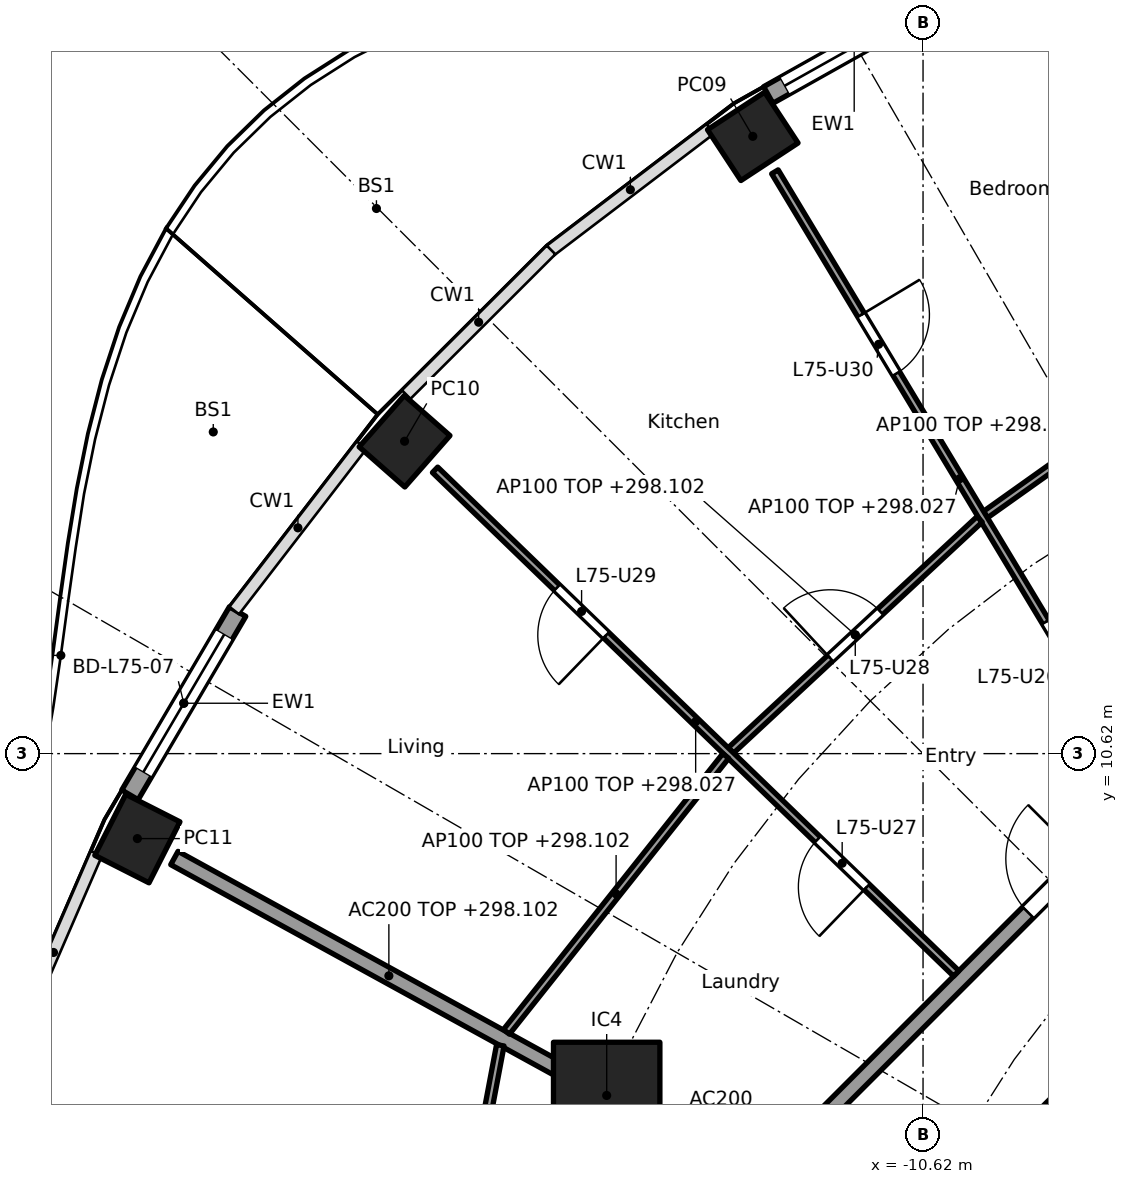
"""IFC4 building model, lengths in metres.
Left out: names, types, materials, properties, quantities, classifications, styles, units other than length and angle.
Written with IfcOpenShell. Run it as: python <this file> out.ifc"""

import sys

from ifc_helpers import new_model, si_unit, direction, frame, frame_2d, origin, origin_2d, place, context, subcontext, project, spatial, rectangle, hollow_rectangle, extrude, element, fill, save


model = new_model("IFC4")
c1 = context("Model", 3, precision=1e-05, world=origin(), true_north=direction((0.0, 1.0)))
c2 = subcontext(c1, "Body", "Model", "MODEL_VIEW")
j1 = project(units=[si_unit("LENGTHUNIT", "METRE"), si_unit("PLANEANGLEUNIT", "RADIAN")], contexts=[c1])
p1 = place(None, origin())
s1 = spatial("IfcSite", under=j1, at=p1, CompositionType="ELEMENT")
p2 = place(p1, origin())
s2 = spatial("IfcBuilding", under=s1, at=p2, CompositionType="ELEMENT")
p3 = place(p2, frame((0.0, 0.0, 295.5)))
s3 = spatial("IfcBuildingStorey", under=s2, at=p3, CompositionType="ELEMENT", Elevation=295.5)
for number, where, z_axis, x_axis in (
    (1, (-12.86, 18.741, 0.0), (0.0, 0.0, 1.0), (-0.836, -0.549, 0.0)),
    (2, (-17.441, 14.73, 0.0), (0.0, 0.0, 1.0), (-0.66, -0.751, 0.0)),
    (3, (-20.957, 9.502, 0.0), (0.0, 0.0, 1.0), (-0.452, -0.892, 0.0)),
):
    element("IfcColumn", number, at=place(p3, frame(where, z_axis=z_axis, x_axis=x_axis)), inside=s3, PredefinedType="COLUMN", context=c2, shape_type="SweptSolid", body=[
        extrude(hollow_rectangle(XDim=0.9, YDim=0.8, WallThickness=0.028, at=origin_2d()), origin(), (0.0, 0.0, 1.0), 3.7),
    ])
p4 = place(p3, frame((-14.782, 6.123, 0.0), z_axis=(0.0, 0.0, 1.0), x_axis=(1.0, 0.0, 0.0)))
e4 = element("IfcColumn", 4, at=p4, inside=s3, PredefinedType="COLUMN", context=c2, shape_type="SweptSolid", body=[
    extrude(rectangle(XDim=1.4, YDim=1.4, at=origin_2d()), origin(), (0.0, 0.0, 1.0), 3.7),
])
p5 = place(p3, frame((-12.656, 19.285, 0.0), z_axis=(0.0, 0.0, 1.0), x_axis=(0.872075426507, 0.489371485154, 0.0)))
e5 = element("IfcWall", 5, at=p5, inside=s3, PredefinedType="SOLIDWALL", context=c2, shape_type="SweptSolid", body=[
    extrude(rectangle(XDim=2.593, YDim=0.25, at=frame_2d((1.297, 0.0))), origin(), (0.0, 0.0, 1.0), 3.28),
])
p6 = place(p5, frame((0.247, 0.0, 0.0)))
e6 = element("IfcOpeningElement", 6, at=p6, cuts=e5, PredefinedType="OPENING", context=c2, shape_type="SweptSolid", body=[
    extrude(rectangle(XDim=2.1, YDim=2.4, at=frame_2d((1.05, 1.2))), frame((0.0, 0.135, 0.0), z_axis=(0.0, -1.0, 0.0), x_axis=(1.0, 0.0, 0.0)), (0.0, 0.0, 1.0), 0.27),
])
p7 = place(p3, frame((-21.054, 10.077, 0.0), z_axis=(0.0, 0.0, 1.0), x_axis=(0.506371364425, 0.862315511452, 0.0)))
e7 = element("IfcWall", 7, at=p7, inside=s3, PredefinedType="SOLIDWALL", context=c2, shape_type="SweptSolid", body=[
    extrude(rectangle(XDim=2.796, YDim=0.25, at=frame_2d((1.398, 0.0))), origin(), (0.0, 0.0, 1.0), 3.28),
])
p8 = place(p7, frame((0.348, 0.0, 0.0)))
e8 = element("IfcOpeningElement", 8, at=p8, cuts=e7, PredefinedType="OPENING", context=c2, shape_type="SweptSolid", body=[
    extrude(rectangle(XDim=2.1, YDim=2.4, at=frame_2d((1.05, 1.2))), frame((0.0, 0.135, 0.0), z_axis=(0.0, -1.0, 0.0), x_axis=(1.0, 0.0, 0.0)), (0.0, 0.0, 1.0), 0.27),
])
p9 = place(p3, frame((-4.613, 9.988, 0.0), z_axis=(0.0, 0.0, 1.0), x_axis=(-0.707106781187, -0.707106781187, 0.0)))
e9 = element("IfcWall", 9, at=p9, inside=s3, PredefinedType="SHEAR", context=c2, shape_type="SweptSolid", body=[
    extrude(rectangle(XDim=7.602, YDim=0.6, at=frame_2d((3.801, 0.0))), origin(), (0.0, 0.0, 1.0), 3.28),
])
p10 = place(p9, frame((0.351, 0.0, 0.0)))
e10 = element("IfcOpeningElement", 10, at=p10, cuts=e9, PredefinedType="OPENING", context=c2, shape_type="SweptSolid", body=[
    extrude(rectangle(XDim=1.1, YDim=2.1, at=frame_2d((0.55, 1.05))), frame((0.0, 0.31, 0.0), z_axis=(0.0, -1.0, 0.0), x_axis=(1.0, 0.0, 0.0)), (0.0, 0.0, 1.0), 0.62),
])
p11 = place(p3, frame((-12.657, 5.243, 0.0), z_axis=(0.0, 0.0, 1.0), x_axis=(-0.923869415315, 0.382707856524, 0.0)))
e11 = element("IfcWall", 11, at=p11, inside=s3, PredefinedType="PARTITIONING", context=c2, shape_type="SweptSolid", body=[
    extrude(rectangle(XDim=2.2, YDim=0.2, at=frame_2d((1.1, 0.0))), origin(), (0.0, 0.0, 1.0), 3.28),
])
p12 = place(p3, frame((-14.826, 6.147, 0.0), z_axis=(0.0, 0.0, 1.0), x_axis=(-0.876484755865, 0.481429613481, 0.0)))
e12 = element("IfcWall", 12, at=p12, inside=s3, PredefinedType="PARTITIONING", context=c2, shape_type="SweptSolid", body=[
    extrude(rectangle(XDim=6.439, YDim=0.2, at=frame_2d((3.219, 0.0))), origin(), (0.0, 0.0, 1.0), 2.602),
])
p13 = place(p3, frame((-5.275, 12.494, 0.0), z_axis=(0.0, 0.0, 1.0), x_axis=(-0.707106781187, -0.707106781187, 0.0)))
e13 = element("IfcWall", 13, at=p13, inside=s3, PredefinedType="PARTITIONING", context=c2, shape_type="SweptSolid", body=[
    extrude(rectangle(XDim=10.209, YDim=0.2, at=frame_2d((5.104, 0.0))), origin(), (0.0, 0.0, 1.0), 3.28),
])
p14 = place(p13, frame((4.604, 0.0, 0.0)))
e14 = element("IfcOpeningElement", 14, at=p14, cuts=e13, PredefinedType="OPENING", context=c2, shape_type="SweptSolid", body=[
    extrude(rectangle(XDim=1.0, YDim=2.1, at=frame_2d((0.5, 1.05))), frame((0.0, 0.11, 0.0), z_axis=(0.0, -1.0, 0.0), x_axis=(1.0, 0.0, 0.0)), (0.0, 0.0, 1.0), 0.22),
])
p15 = place(p3, frame((-6.508, 16.103, 0.0), z_axis=(0.0, 0.0, 1.0), x_axis=(-0.815202203556, -0.579176456114, 0.0)))
e15 = element("IfcWall", 15, at=p15, inside=s3, PredefinedType="PARTITIONING", context=c2, shape_type="SweptSolid", body=[
    extrude(rectangle(XDim=4.036, YDim=0.1, at=frame_2d((2.018, 0.0))), origin(), (0.0, 0.0, 1.0), 2.602),
])
p16 = place(p3, frame((-7.709, 10.197, 0.0), z_axis=(0.0, 0.0, 1.0), x_axis=(-0.515516160663, 0.856879856278, 0.0)))
e16 = element("IfcWall", 16, at=p16, inside=s3, PredefinedType="PARTITIONING", context=c2, shape_type="SweptSolid", body=[
    extrude(rectangle(XDim=9.426, YDim=0.1, at=frame_2d((4.713, 0.0))), origin(), (0.0, 0.0, 1.0), 2.527),
])
p17 = place(p16, frame((1.615, 0.0, 0.0)))
e17 = element("IfcOpeningElement", 17, at=p17, cuts=e16, PredefinedType="OPENING", context=c2, shape_type="SweptSolid", body=[
    extrude(rectangle(XDim=0.9, YDim=2.1, at=frame_2d((0.45, 1.05))), frame((0.0, 0.06, 0.0), z_axis=(0.0, -1.0, 0.0), x_axis=(1.0, 0.0, 0.0)), (0.0, 0.0, 1.0), 0.12),
])
p18 = place(p16, frame((6.328, 0.0, 0.0)))
e18 = element("IfcOpeningElement", 18, at=p18, cuts=e16, PredefinedType="OPENING", context=c2, shape_type="SweptSolid", body=[
    extrude(rectangle(XDim=0.9, YDim=2.1, at=frame_2d((0.45, 1.05))), frame((0.0, 0.06, 0.0), z_axis=(0.0, -1.0, 0.0), x_axis=(1.0, 0.0, 0.0)), (0.0, 0.0, 1.0), 0.12),
])
p19 = place(p3, frame((-9.875, 13.702, 0.0), z_axis=(0.0, 0.0, 1.0), x_axis=(-0.732618266441, -0.680639754699, 0.0)))
e19 = element("IfcWall", 19, at=p19, inside=s3, PredefinedType="PARTITIONING", context=c2, shape_type="SweptSolid", body=[
    extrude(rectangle(XDim=4.467, YDim=0.1, at=frame_2d((2.233, 0.0))), origin(), (0.0, 0.0, 1.0), 2.602),
])
p20 = place(p19, frame((1.783, 0.0, 0.0)))
e20 = element("IfcOpeningElement", 20, at=p20, cuts=e19, PredefinedType="OPENING", context=c2, shape_type="SweptSolid", body=[
    extrude(rectangle(XDim=0.9, YDim=2.1, at=frame_2d((0.45, 1.05))), frame((0.0, 0.06, 0.0), z_axis=(0.0, -1.0, 0.0), x_axis=(1.0, 0.0, 0.0)), (0.0, 0.0, 1.0), 0.12),
])
p21 = place(p3, frame((-10.183, 7.727, 0.0), z_axis=(0.0, 0.0, 1.0), x_axis=(-0.719063433856, 0.694944442449, 0.0)))
e21 = element("IfcWall", 21, at=p21, inside=s3, PredefinedType="PARTITIONING", context=c2, shape_type="SweptSolid", body=[
    extrude(rectangle(XDim=9.535, YDim=0.1, at=frame_2d((4.768, 0.0))), origin(), (0.0, 0.0, 1.0), 2.527),
])
p22 = place(p21, frame((1.637, 0.0, 0.0)))
e22 = element("IfcOpeningElement", 22, at=p22, cuts=e21, PredefinedType="OPENING", context=c2, shape_type="SweptSolid", body=[
    extrude(rectangle(XDim=0.9, YDim=2.1, at=frame_2d((0.45, 1.05))), frame((0.0, 0.06, 0.0), z_axis=(0.0, -1.0, 0.0), x_axis=(1.0, 0.0, 0.0)), (0.0, 0.0, 1.0), 0.12),
])
p23 = place(p21, frame((6.405, 0.0, 0.0)))
e23 = element("IfcOpeningElement", 23, at=p23, cuts=e21, PredefinedType="OPENING", context=c2, shape_type="SweptSolid", body=[
    extrude(rectangle(XDim=0.9, YDim=2.1, at=frame_2d((0.45, 1.05))), frame((0.0, 0.06, 0.0), z_axis=(0.0, -1.0, 0.0), x_axis=(1.0, 0.0, 0.0)), (0.0, 0.0, 1.0), 0.12),
])
p24 = place(p3, frame((-13.216, 10.589, 0.0), z_axis=(0.0, 0.0, 1.0), x_axis=(-0.622251572882, -0.782817335045, 0.0)))
e24 = element("IfcWall", 24, at=p24, inside=s3, PredefinedType="PARTITIONING", context=c2, shape_type="SweptSolid", body=[
    extrude(rectangle(XDim=4.636, YDim=0.1, at=frame_2d((2.318, 0.0))), origin(), (0.0, 0.0, 1.0), 2.602),
])
p25 = place(p3, frame((-16.181, 6.783, 0.0), z_axis=(0.0, 0.0, 1.0), x_axis=(-0.185670583745, -0.982612046706, 0.0)))
e25 = element("IfcWall", 25, at=p25, inside=s3, PredefinedType="PARTITIONING", context=c2, shape_type="SweptSolid", body=[
    extrude(rectangle(XDim=4.351, YDim=0.1, at=frame_2d((2.176, 0.0))), origin(), (0.0, 0.0, 1.0), 2.602),
])
p26 = place(p25, frame((1.726, 0.0, 0.0)))
e26 = element("IfcOpeningElement", 26, at=p26, cuts=e25, PredefinedType="OPENING", context=c2, shape_type="SweptSolid", body=[
    extrude(rectangle(XDim=0.9, YDim=2.1, at=frame_2d((0.45, 1.05))), frame((0.0, 0.06, 0.0), z_axis=(0.0, -1.0, 0.0), x_axis=(1.0, 0.0, 0.0)), (0.0, 0.0, 1.0), 0.12),
])
p27 = place(p6, origin())
e27 = element("IfcDoor", 27, at=p27, inside=s3, OperationType="SLIDING_TO_LEFT", PredefinedType="DOOR", context=c2, shape_type="SweptSolid", body=[
    extrude(rectangle(XDim=2.1, YDim=2.4, at=frame_2d((1.05, 1.2))), frame((0.0, 0.025, 0.0), z_axis=(0.0, -1.0, 0.0), x_axis=(1.0, 0.0, 0.0)), (0.0, 0.0, 1.0), 0.05),
])
fill(e6, e27)
p28 = place(p8, origin())
e28 = element("IfcDoor", 28, at=p28, inside=s3, OperationType="SLIDING_TO_LEFT", PredefinedType="DOOR", context=c2, shape_type="SweptSolid", body=[
    extrude(rectangle(XDim=2.1, YDim=2.4, at=frame_2d((1.05, 1.2))), frame((0.0, 0.025, 0.0), z_axis=(0.0, -1.0, 0.0), x_axis=(1.0, 0.0, 0.0)), (0.0, 0.0, 1.0), 0.05),
])
fill(e8, e28)
p29 = place(p14, frame((1.0, 0.0, 0.0), x_axis=(-1.0, 0.0, 0.0)))
e29 = element("IfcDoor", 29, at=p29, inside=s3, OperationType="SINGLE_SWING_RIGHT", PredefinedType="DOOR", context=c2, shape_type="SweptSolid", body=[
    extrude(rectangle(XDim=1.0, YDim=2.1, at=frame_2d((0.5, 1.05))), frame((0.0, 0.025, 0.0), z_axis=(0.0, -1.0, 0.0), x_axis=(1.0, 0.0, 0.0)), (0.0, 0.0, 1.0), 0.05),
])
fill(e14, e29)
p30 = place(p17, frame((0.9, 0.0, 0.0), x_axis=(-1.0, 0.0, 0.0)))
e30 = element("IfcDoor", 30, at=p30, inside=s3, OperationType="SINGLE_SWING_LEFT", PredefinedType="DOOR", context=c2, shape_type="SweptSolid", body=[
    extrude(rectangle(XDim=0.9, YDim=2.1, at=frame_2d((0.45, 1.05))), frame((0.0, 0.025, 0.0), z_axis=(0.0, -1.0, 0.0), x_axis=(1.0, 0.0, 0.0)), (0.0, 0.0, 1.0), 0.05),
])
fill(e17, e30)
p31 = place(p22, origin())
e31 = element("IfcDoor", 31, at=p31, inside=s3, OperationType="SINGLE_SWING_LEFT", PredefinedType="DOOR", context=c2, shape_type="SweptSolid", body=[
    extrude(rectangle(XDim=0.9, YDim=2.1, at=frame_2d((0.45, 1.05))), frame((0.0, 0.025, 0.0), z_axis=(0.0, -1.0, 0.0), x_axis=(1.0, 0.0, 0.0)), (0.0, 0.0, 1.0), 0.05),
])
fill(e22, e31)
p32 = place(p20, frame((0.9, 0.0, 0.0), x_axis=(-1.0, 0.0, 0.0)))
e32 = element("IfcDoor", 32, at=p32, inside=s3, OperationType="SINGLE_SWING_LEFT", PredefinedType="DOOR", context=c2, shape_type="SweptSolid", body=[
    extrude(rectangle(XDim=0.9, YDim=2.1, at=frame_2d((0.45, 1.05))), frame((0.0, 0.025, 0.0), z_axis=(0.0, -1.0, 0.0), x_axis=(1.0, 0.0, 0.0)), (0.0, 0.0, 1.0), 0.05),
])
fill(e20, e32)
p33 = place(p23, origin())
e33 = element("IfcDoor", 33, at=p33, inside=s3, OperationType="SINGLE_SWING_LEFT", PredefinedType="DOOR", context=c2, shape_type="SweptSolid", body=[
    extrude(rectangle(XDim=0.9, YDim=2.1, at=frame_2d((0.45, 1.05))), frame((0.0, 0.025, 0.0), z_axis=(0.0, -1.0, 0.0), x_axis=(1.0, 0.0, 0.0)), (0.0, 0.0, 1.0), 0.05),
])
fill(e23, e33)
p34 = place(p18, frame((0.9, 0.0, 0.0), x_axis=(-1.0, 0.0, 0.0)))
e34 = element("IfcDoor", 34, at=p34, inside=s3, OperationType="SINGLE_SWING_LEFT", PredefinedType="DOOR", context=c2, shape_type="SweptSolid", body=[
    extrude(rectangle(XDim=0.9, YDim=2.1, at=frame_2d((0.45, 1.05))), frame((0.0, 0.025, 0.0), z_axis=(0.0, -1.0, 0.0), x_axis=(1.0, 0.0, 0.0)), (0.0, 0.0, 1.0), 0.05),
])
fill(e18, e34)
save(model, sys.argv[1])
